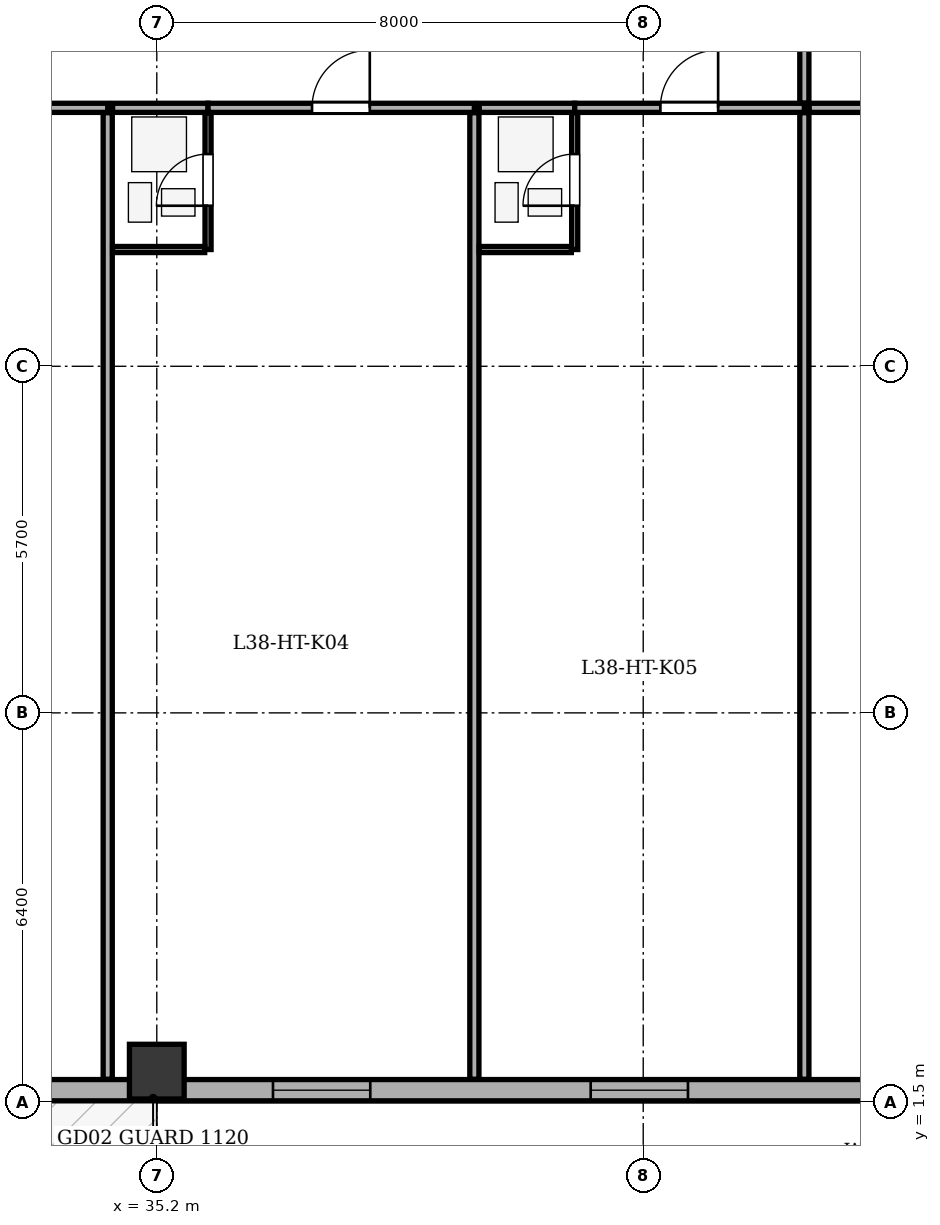
"""IFC4 building model, lengths in metres.
Left out: names, types, materials, properties, quantities, classifications, styles, units other than length and angle.
Written with IfcOpenShell. Run it as: python <this file> out.ifc"""

import sys

from ifc_helpers import new_model, si_unit, direction, frame, frame_2d, origin, origin_2d, place, context, subcontext, project, spatial, rectangle, extrude, element, fill, save


model = new_model("IFC4")
c1 = context("Model", 3, precision=1e-05, world=origin(), true_north=direction((0.0, 1.0)))
c2 = subcontext(c1, "Body", "Model", "MODEL_VIEW")
j1 = project(units=[si_unit("LENGTHUNIT", "METRE"), si_unit("PLANEANGLEUNIT", "RADIAN")], contexts=[c1])
p1 = place(None, origin())
s1 = spatial("IfcSite", under=j1, at=p1, CompositionType="ELEMENT")
p2 = place(p1, origin())
s2 = spatial("IfcBuilding", under=s1, at=p2, CompositionType="ELEMENT")
p3 = place(p2, frame((0.0, 0.0, 151.8)))
s3 = spatial("IfcBuildingStorey", under=s2, at=p3, CompositionType="ELEMENT", Elevation=151.8)
p4 = place(p3, frame((35.2, 2.0, 0.0), z_axis=(0.0, 0.0, 1.0), x_axis=(1.0, 0.0, 0.0)))
e1 = element("IfcColumn", 1, at=p4, inside=s3, PredefinedType="COLUMN", context=c2, shape_type="SweptSolid", body=[
    extrude(rectangle(XDim=0.9, YDim=0.9, at=origin_2d()), origin(), (0.0, 0.0, 1.0), 3.5),
])
p5 = place(p3, frame((50.7, 1.695, 0.0), z_axis=(0.0, 0.0, 1.0), x_axis=(-1.0, 0.0, 0.0)))
e2 = element("IfcWall", 2, at=p5, inside=s3, PredefinedType="STANDARD", context=c2, shape_type="SweptSolid", body=[
    extrude(rectangle(XDim=35.0, YDim=0.35, at=frame_2d((17.5, 0.0))), origin(), (0.0, 0.0, 1.0), 2.785),
])
p6 = place(p5, frame((26.0, 0.0, 0.0)))
e3 = element("IfcOpeningElement", 3, at=p6, cuts=e2, PredefinedType="OPENING", context=c2, shape_type="SweptSolid", body=[
    extrude(rectangle(XDim=1.0, YDim=2.02, at=frame_2d((0.5, 1.01))), frame((0.0, 0.185, 0.0), z_axis=(0.0, -1.0, 0.0), x_axis=(1.0, 0.0, 0.0)), (0.0, 0.0, 1.0), 0.37),
])
p7 = place(p5, frame((1.763, 0.0, 0.75)))
e4 = element("IfcOpeningElement", 4, at=p7, cuts=e2, PredefinedType="OPENING", context=c2, shape_type="SweptSolid", body=[
    extrude(rectangle(XDim=1.6, YDim=1.75, at=frame_2d((0.8, 0.875))), frame((0.0, 0.185, 0.0), z_axis=(0.0, -1.0, 0.0), x_axis=(1.0, 0.0, 0.0)), (0.0, 0.0, 1.0), 0.37),
])
p8 = place(p5, frame((6.764, 0.0, 0.75)))
e5 = element("IfcOpeningElement", 5, at=p8, cuts=e2, PredefinedType="OPENING", context=c2, shape_type="SweptSolid", body=[
    extrude(rectangle(XDim=1.6, YDim=1.75, at=frame_2d((0.8, 0.875))), frame((0.0, 0.185, 0.0), z_axis=(0.0, -1.0, 0.0), x_axis=(1.0, 0.0, 0.0)), (0.0, 0.0, 1.0), 0.37),
])
p9 = place(p5, frame((11.989, 0.0, 0.75)))
e6 = element("IfcOpeningElement", 6, at=p9, cuts=e2, PredefinedType="OPENING", context=c2, shape_type="SweptSolid", body=[
    extrude(rectangle(XDim=1.6, YDim=1.75, at=frame_2d((0.8, 0.875))), frame((0.0, 0.185, 0.0), z_axis=(0.0, -1.0, 0.0), x_axis=(1.0, 0.0, 0.0)), (0.0, 0.0, 1.0), 0.37),
])
p10 = place(p5, frame((18.604, 0.0, 0.75)))
e7 = element("IfcOpeningElement", 7, at=p10, cuts=e2, PredefinedType="OPENING", context=c2, shape_type="SweptSolid", body=[
    extrude(rectangle(XDim=1.6, YDim=1.75, at=frame_2d((0.8, 0.875))), frame((0.0, 0.185, 0.0), z_axis=(0.0, -1.0, 0.0), x_axis=(1.0, 0.0, 0.0)), (0.0, 0.0, 1.0), 0.37),
])
p11 = place(p5, frame((31.613, 0.0, 0.75)))
e8 = element("IfcOpeningElement", 8, at=p11, cuts=e2, PredefinedType="OPENING", context=c2, shape_type="SweptSolid", body=[
    extrude(rectangle(XDim=1.6, YDim=1.75, at=frame_2d((0.8, 0.875))), frame((0.0, 0.185, 0.0), z_axis=(0.0, -1.0, 0.0), x_axis=(1.0, 0.0, 0.0)), (0.0, 0.0, 1.0), 0.37),
])
p12 = place(p3, frame((29.711, 17.85, 0.0), z_axis=(0.0, 0.0, 1.0), x_axis=(1.0, 0.0, 0.0)))
e9 = element("IfcWall", 9, at=p12, inside=s3, PredefinedType="PARTITIONING", context=c2, shape_type="SweptSolid", body=[
    extrude(rectangle(XDim=4.682, YDim=0.15, at=frame_2d((2.341, 0.0))), origin(), (0.0, 0.0, 1.0), 3.2),
])
p13 = place(p12, frame((1.861, 0.0, 0.0)))
e10 = element("IfcOpeningElement", 10, at=p13, cuts=e9, PredefinedType="OPENING", context=c2, shape_type="SweptSolid", body=[
    extrude(rectangle(XDim=0.95, YDim=2.1, at=frame_2d((0.475, 1.05))), frame((0.0, 0.085, 0.0), z_axis=(0.0, -1.0, 0.0), x_axis=(1.0, 0.0, 0.0)), (0.0, 0.0, 1.0), 0.17),
])
p14 = place(p3, frame((34.393, 1.875, 0.0), z_axis=(0.0, 0.0, 1.0), x_axis=(0.0, 1.0, 0.0)))
e11 = element("IfcWall", 11, at=p14, inside=s3, PredefinedType="PARTITIONING", context=c2, shape_type="SweptSolid", body=[
    extrude(rectangle(XDim=15.895, YDim=0.15, at=frame_2d((7.948, 0.0))), origin(), (0.0, 0.0, 1.0), 3.2),
])
p15 = place(p3, frame((34.473, 17.85, 0.0), z_axis=(0.0, 0.0, 1.0), x_axis=(1.0, 0.0, 0.0)))
e12 = element("IfcWall", 12, at=p15, inside=s3, PredefinedType="PARTITIONING", context=c2, shape_type="SweptSolid", body=[
    extrude(rectangle(XDim=1.57, YDim=0.15, at=frame_2d((0.785, 0.0))), origin(), (0.0, 0.0, 1.0), 3.2),
])
p16 = place(p3, frame((36.043, 17.85, 0.0), z_axis=(0.0, 0.0, 1.0), x_axis=(1.0, 0.0, 0.0)))
e13 = element("IfcWall", 13, at=p16, inside=s3, PredefinedType="PARTITIONING", context=c2, shape_type="SweptSolid", body=[
    extrude(rectangle(XDim=4.38, YDim=0.15, at=frame_2d((2.19, 0.0))), origin(), (0.0, 0.0, 1.0), 3.2),
])
p17 = place(p16, frame((1.71, 0.0, 0.0)))
e14 = element("IfcOpeningElement", 14, at=p17, cuts=e13, PredefinedType="OPENING", context=c2, shape_type="SweptSolid", body=[
    extrude(rectangle(XDim=0.95, YDim=2.1, at=frame_2d((0.475, 1.05))), frame((0.0, 0.085, 0.0), z_axis=(0.0, -1.0, 0.0), x_axis=(1.0, 0.0, 0.0)), (0.0, 0.0, 1.0), 0.17),
])
p18 = place(p3, frame((36.043, 15.52, 0.0), z_axis=(0.0, 0.0, 1.0), x_axis=(0.0, 1.0, 0.0)))
e15 = element("IfcWall", 15, at=p18, inside=s3, PredefinedType="PARTITIONING", context=c2, shape_type="SweptSolid", body=[
    extrude(rectangle(XDim=2.25, YDim=0.1, at=frame_2d((1.125, 0.0))), origin(), (0.0, 0.0, 1.0), 3.2),
])
p19 = place(p18, frame((0.72, 0.0, 0.0)))
e16 = element("IfcOpeningElement", 16, at=p19, cuts=e15, PredefinedType="OPENING", context=c2, shape_type="SweptSolid", body=[
    extrude(rectangle(XDim=0.85, YDim=2.05, at=frame_2d((0.425, 1.025))), frame((0.0, 0.06, 0.0), z_axis=(0.0, -1.0, 0.0), x_axis=(1.0, 0.0, 0.0)), (0.0, 0.0, 1.0), 0.12),
])
p20 = place(p3, frame((34.473, 15.52, 0.0), z_axis=(0.0, 0.0, 1.0), x_axis=(1.0, 0.0, 0.0)))
e17 = element("IfcWall", 17, at=p20, inside=s3, PredefinedType="PARTITIONING", context=c2, shape_type="SweptSolid", body=[
    extrude(rectangle(XDim=1.515, YDim=0.1, at=frame_2d((0.758, 0.0))), origin(), (0.0, 0.0, 1.0), 3.2),
])
p21 = place(p3, frame((40.423, 1.875, 0.0), z_axis=(0.0, 0.0, 1.0), x_axis=(0.0, 1.0, 0.0)))
e18 = element("IfcWall", 18, at=p21, inside=s3, PredefinedType="PARTITIONING", context=c2, shape_type="SweptSolid", body=[
    extrude(rectangle(XDim=15.895, YDim=0.15, at=frame_2d((7.948, 0.0))), origin(), (0.0, 0.0, 1.0), 3.2),
])
p22 = place(p3, frame((40.503, 17.85, 0.0), z_axis=(0.0, 0.0, 1.0), x_axis=(1.0, 0.0, 0.0)))
e19 = element("IfcWall", 19, at=p22, inside=s3, PredefinedType="PARTITIONING", context=c2, shape_type="SweptSolid", body=[
    extrude(rectangle(XDim=1.57, YDim=0.15, at=frame_2d((0.785, 0.0))), origin(), (0.0, 0.0, 1.0), 3.2),
])
p23 = place(p3, frame((42.073, 17.85, 0.0), z_axis=(0.0, 0.0, 1.0), x_axis=(1.0, 0.0, 0.0)))
e20 = element("IfcWall", 20, at=p23, inside=s3, PredefinedType="PARTITIONING", context=c2, shape_type="SweptSolid", body=[
    extrude(rectangle(XDim=3.777, YDim=0.15, at=frame_2d((1.889, 0.0))), origin(), (0.0, 0.0, 1.0), 3.2),
])
p24 = place(p23, frame((1.409, 0.0, 0.0)))
e21 = element("IfcOpeningElement", 21, at=p24, cuts=e20, PredefinedType="OPENING", context=c2, shape_type="SweptSolid", body=[
    extrude(rectangle(XDim=0.95, YDim=2.1, at=frame_2d((0.475, 1.05))), frame((0.0, 0.085, 0.0), z_axis=(0.0, -1.0, 0.0), x_axis=(1.0, 0.0, 0.0)), (0.0, 0.0, 1.0), 0.17),
])
p25 = place(p3, frame((42.073, 15.52, 0.0), z_axis=(0.0, 0.0, 1.0), x_axis=(0.0, 1.0, 0.0)))
e22 = element("IfcWall", 22, at=p25, inside=s3, PredefinedType="PARTITIONING", context=c2, shape_type="SweptSolid", body=[
    extrude(rectangle(XDim=2.25, YDim=0.1, at=frame_2d((1.125, 0.0))), origin(), (0.0, 0.0, 1.0), 3.2),
])
p26 = place(p25, frame((0.72, 0.0, 0.0)))
e23 = element("IfcOpeningElement", 23, at=p26, cuts=e22, PredefinedType="OPENING", context=c2, shape_type="SweptSolid", body=[
    extrude(rectangle(XDim=0.85, YDim=2.05, at=frame_2d((0.425, 1.025))), frame((0.0, 0.06, 0.0), z_axis=(0.0, -1.0, 0.0), x_axis=(1.0, 0.0, 0.0)), (0.0, 0.0, 1.0), 0.12),
])
p27 = place(p3, frame((40.503, 15.52, 0.0), z_axis=(0.0, 0.0, 1.0), x_axis=(1.0, 0.0, 0.0)))
e24 = element("IfcWall", 24, at=p27, inside=s3, PredefinedType="PARTITIONING", context=c2, shape_type="SweptSolid", body=[
    extrude(rectangle(XDim=1.515, YDim=0.1, at=frame_2d((0.758, 0.0))), origin(), (0.0, 0.0, 1.0), 3.2),
])
p28 = place(p3, frame((45.85, 1.875, 0.0), z_axis=(0.0, 0.0, 1.0), x_axis=(0.0, 1.0, 0.0)))
e25 = element("IfcWall", 25, at=p28, inside=s3, PredefinedType="PARTITIONING", context=c2, shape_type="SweptSolid", body=[
    extrude(rectangle(XDim=15.895, YDim=0.15, at=frame_2d((7.948, 0.0))), origin(), (0.0, 0.0, 1.0), 3.2),
])
p29 = place(p3, frame((45.93, 17.85, 0.0), z_axis=(0.0, 0.0, 1.0), x_axis=(1.0, 0.0, 0.0)))
e26 = element("IfcWall", 26, at=p29, inside=s3, PredefinedType="PARTITIONING", context=c2, shape_type="SweptSolid", body=[
    extrude(rectangle(XDim=9.395, YDim=0.15, at=frame_2d((4.698, 0.0))), origin(), (0.0, 0.0, 1.0), 3.2),
])
p30 = place(p3, frame((45.85, 17.93, 0.0), z_axis=(0.0, 0.0, 1.0), x_axis=(0.0, 1.0, 0.0)))
e27 = element("IfcWall", 27, at=p30, inside=s3, PredefinedType="PARTITIONING", context=c2, shape_type="SweptSolid", body=[
    extrude(rectangle(XDim=6.07, YDim=0.15, at=frame_2d((3.035, 0.0))), origin(), (0.0, 0.0, 1.0), 3.2),
])
p31 = place(p30, frame((2.515, 0.0, 0.0)))
e28 = element("IfcOpeningElement", 28, at=p31, cuts=e27, PredefinedType="OPENING", context=c2, shape_type="SweptSolid", body=[
    extrude(rectangle(XDim=0.95, YDim=2.1, at=frame_2d((0.475, 1.05))), frame((0.0, 0.085, 0.0), z_axis=(0.0, -1.0, 0.0), x_axis=(1.0, 0.0, 0.0)), (0.0, 0.0, 1.0), 0.17),
])
p32 = place(p8, origin())
e29 = element("IfcWindow", 29, at=p32, inside=s3, PartitioningType="SINGLE_PANEL", PredefinedType="WINDOW", context=c2, shape_type="SweptSolid", body=[
    extrude(rectangle(XDim=1.6, YDim=1.75, at=frame_2d((0.8, 0.875))), frame((0.0, -0.01, 0.0), z_axis=(0.0, -1.0, 0.0), x_axis=(1.0, 0.0, 0.0)), (0.0, 0.0, 1.0), 0.06),
])
fill(e5, e29)
p33 = place(p9, origin())
e30 = element("IfcWindow", 30, at=p33, inside=s3, PartitioningType="SINGLE_PANEL", PredefinedType="WINDOW", context=c2, shape_type="SweptSolid", body=[
    extrude(rectangle(XDim=1.6, YDim=1.75, at=frame_2d((0.8, 0.875))), frame((0.0, -0.01, 0.0), z_axis=(0.0, -1.0, 0.0), x_axis=(1.0, 0.0, 0.0)), (0.0, 0.0, 1.0), 0.06),
])
fill(e6, e30)
p34 = place(p19, origin())
e31 = element("IfcDoor", 31, at=p34, inside=s3, OperationType="SINGLE_SWING_LEFT", PredefinedType="DOOR", context=c2, shape_type="SweptSolid", body=[
    extrude(rectangle(XDim=0.85, YDim=2.05, at=frame_2d((0.425, 1.025))), frame((0.0, 0.025, 0.0), z_axis=(0.0, -1.0, 0.0), x_axis=(1.0, 0.0, 0.0)), (0.0, 0.0, 1.0), 0.05),
])
fill(e16, e31)
p35 = place(p17, origin())
e32 = element("IfcDoor", 32, at=p35, inside=s3, OperationType="SINGLE_SWING_RIGHT", PredefinedType="DOOR", context=c2, shape_type="SweptSolid", body=[
    extrude(rectangle(XDim=0.95, YDim=2.1, at=frame_2d((0.475, 1.05))), frame((0.0, 0.025, 0.0), z_axis=(0.0, -1.0, 0.0), x_axis=(1.0, 0.0, 0.0)), (0.0, 0.0, 1.0), 0.05),
])
fill(e14, e32)
p36 = place(p26, origin())
e33 = element("IfcDoor", 33, at=p36, inside=s3, OperationType="SINGLE_SWING_LEFT", PredefinedType="DOOR", context=c2, shape_type="SweptSolid", body=[
    extrude(rectangle(XDim=0.85, YDim=2.05, at=frame_2d((0.425, 1.025))), frame((0.0, 0.025, 0.0), z_axis=(0.0, -1.0, 0.0), x_axis=(1.0, 0.0, 0.0)), (0.0, 0.0, 1.0), 0.05),
])
fill(e23, e33)
p37 = place(p24, origin())
e34 = element("IfcDoor", 34, at=p37, inside=s3, OperationType="SINGLE_SWING_RIGHT", PredefinedType="DOOR", context=c2, shape_type="SweptSolid", body=[
    extrude(rectangle(XDim=0.95, YDim=2.1, at=frame_2d((0.475, 1.05))), frame((0.0, 0.025, 0.0), z_axis=(0.0, -1.0, 0.0), x_axis=(1.0, 0.0, 0.0)), (0.0, 0.0, 1.0), 0.05),
])
fill(e21, e34)
save(model, sys.argv[1])
